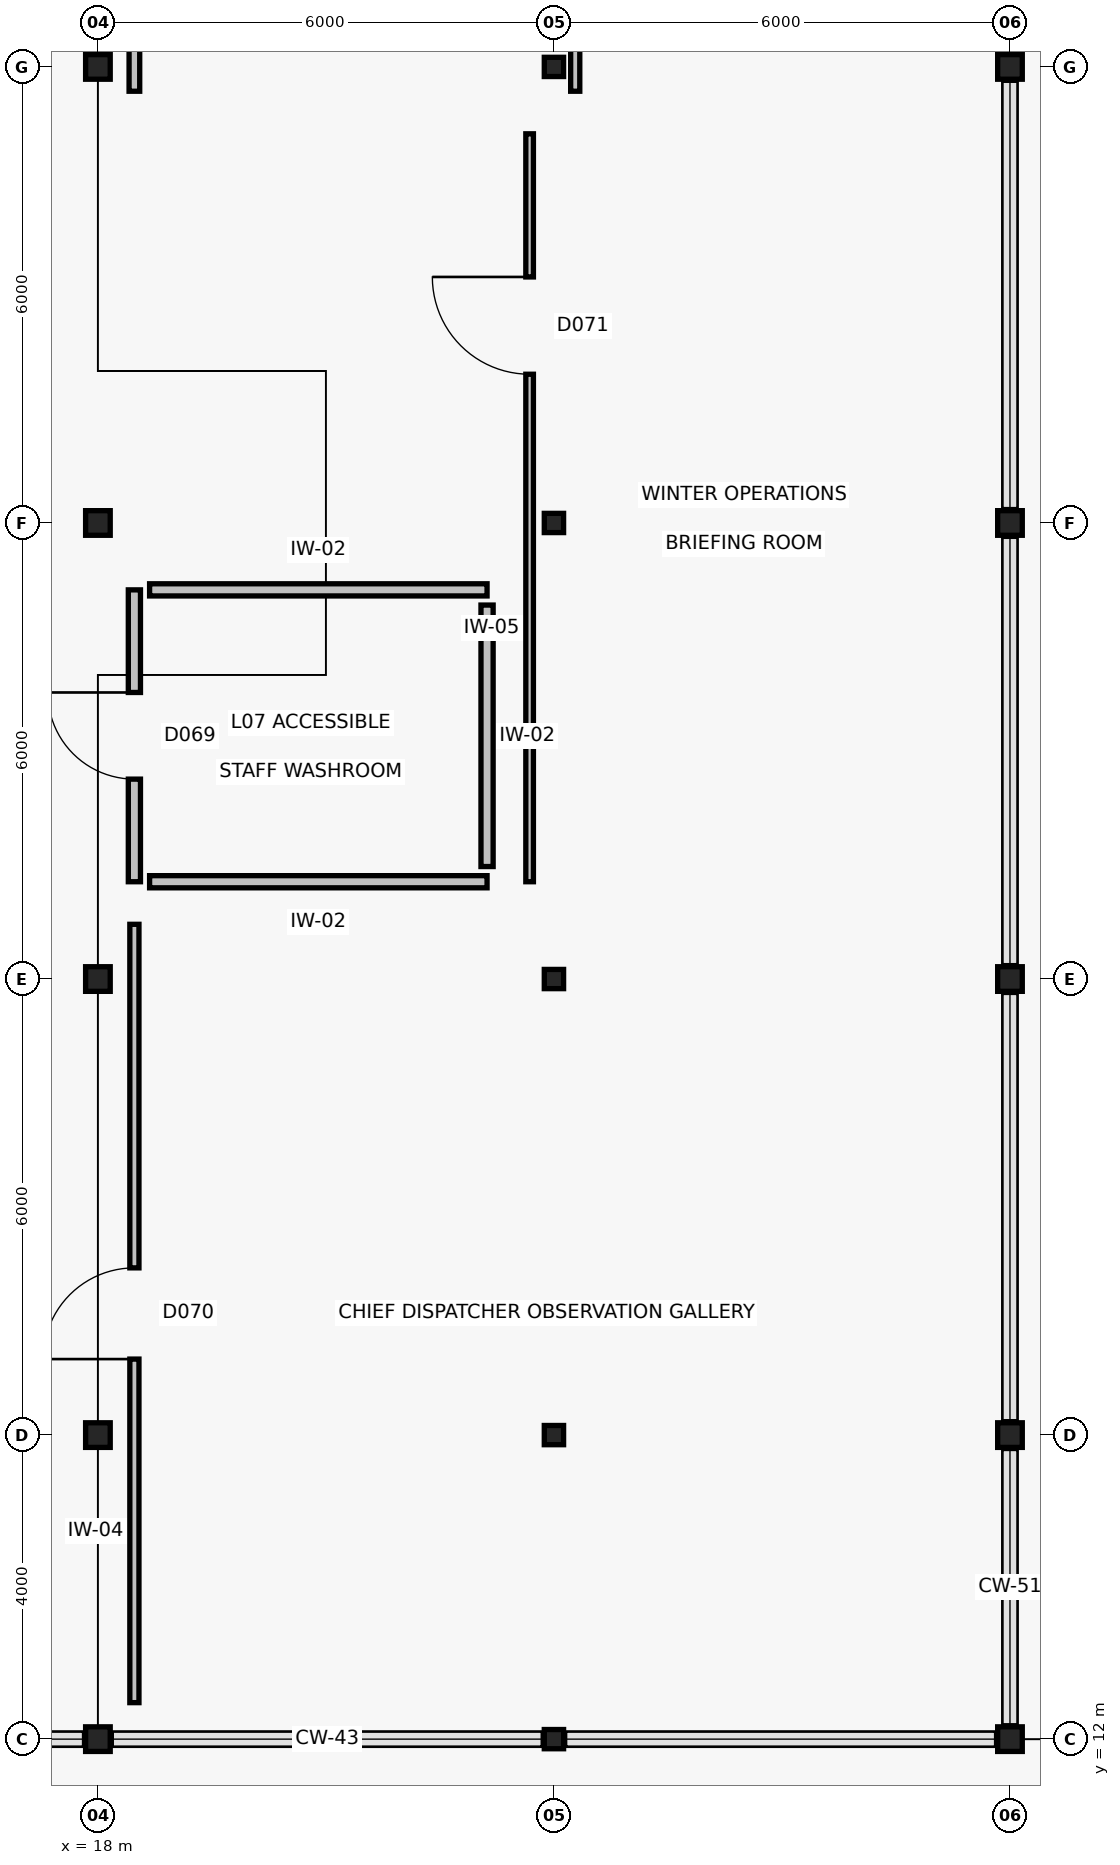
"""IFC4 building model, lengths in metres.
Left out: names, types, materials, properties, quantities, classifications, styles, units other than length and angle.
Written with IfcOpenShell. Run it as: python <this file> out.ifc"""

import sys

from ifc_helpers import new_model, si_unit, direction, frame, frame_2d, origin, origin_2d, place, context, subcontext, project, spatial, rectangle, hollow_circle, i_section, extrude, element, fill, save


model = new_model("IFC4")
c1 = context("Model", 3, precision=1e-05, world=origin(), true_north=direction((0.0, 1.0)))
c2 = subcontext(c1, "Body", "Model", "MODEL_VIEW")
j1 = project(units=[si_unit("LENGTHUNIT", "METRE"), si_unit("PLANEANGLEUNIT", "RADIAN")], contexts=[c1])
p1 = place(None, origin())
s1 = spatial("IfcSite", under=j1, at=p1, CompositionType="ELEMENT")
p2 = place(p1, origin())
s2 = spatial("IfcBuilding", under=s1, at=p2, CompositionType="ELEMENT")
p3 = place(p2, frame((0.0, 0.0, 28.6)))
s3 = spatial("IfcBuildingStorey", under=s2, at=p3, CompositionType="ELEMENT", Elevation=28.6)
for number, where, z_axis, x_axis in (
    (1, (18.0, 12.0, 0.0), (0.0, 0.0, 1.0), (1.0, 0.0, 0.0)),
    (2, (18.0, 16.0, 0.0), (0.0, 0.0, 1.0), (1.0, 0.0, 0.0)),
    (3, (18.0, 22.0, 0.0), (0.0, 0.0, 1.0), (1.0, 0.0, 0.0)),
    (4, (18.0, 28.0, 0.0), (0.0, 0.0, 1.0), (1.0, 0.0, 0.0)),
    (5, (18.0, 34.0, 0.0), (0.0, 0.0, 1.0), (1.0, 0.0, 0.0)),
):
    element("IfcColumn", number, at=place(p3, frame(where, z_axis=z_axis, x_axis=x_axis)), inside=s3, PredefinedType="COLUMN", context=c2, shape_type="SweptSolid", body=[
        extrude(hollow_circle(Radius=0.162, WallThickness=0.013, at=origin_2d()), origin(), (0.0, 0.0, 1.0), 4.2),
    ])
for number, where, z_axis, x_axis in (
    (6, (24.0, 12.0, 0.0), (0.0, 0.0, 1.0), (1.0, 0.0, 0.0)),
    (7, (24.0, 16.0, 0.0), (0.0, 0.0, 1.0), (1.0, 0.0, 0.0)),
    (8, (24.0, 22.0, 0.0), (0.0, 0.0, 1.0), (1.0, 0.0, 0.0)),
    (9, (24.0, 28.0, 0.0), (0.0, 0.0, 1.0), (1.0, 0.0, 0.0)),
    (10, (24.0, 34.0, 0.0), (0.0, 0.0, 1.0), (1.0, 0.0, 0.0)),
):
    element("IfcColumn", number, at=place(p3, frame(where, z_axis=z_axis, x_axis=x_axis)), inside=s3, PredefinedType="COLUMN", context=c2, shape_type="SweptSolid", body=[
        extrude(i_section(OverallWidth=0.254, OverallDepth=0.253, WebThickness=0.009, FlangeThickness=0.014, FilletRadius=0.012, at=origin_2d()), origin(), (0.0, 0.0, 1.0), 4.2),
    ])
for number, where, z_axis, x_axis in (
    (11, (30.0, 12.0, 0.0), (0.0, 0.0, 1.0), (1.0, 0.0, 0.0)),
    (12, (30.0, 16.0, 0.0), (0.0, 0.0, 1.0), (1.0, 0.0, 0.0)),
    (13, (30.0, 22.0, 0.0), (0.0, 0.0, 1.0), (1.0, 0.0, 0.0)),
    (14, (30.0, 28.0, 0.0), (0.0, 0.0, 1.0), (1.0, 0.0, 0.0)),
    (15, (30.0, 34.0, 0.0), (0.0, 0.0, 1.0), (1.0, 0.0, 0.0)),
):
    element("IfcColumn", number, at=place(p3, frame(where, z_axis=z_axis, x_axis=x_axis)), inside=s3, PredefinedType="COLUMN", context=c2, shape_type="SweptSolid", body=[
        extrude(hollow_circle(Radius=0.162, WallThickness=0.013, at=origin_2d()), origin(), (0.0, 0.0, 1.0), 4.2),
    ])
p4 = place(p3, frame((18.48, 23.28, 0.0), z_axis=(0.0, 0.0, 1.0), x_axis=(0.0, 1.0, 0.0)))
e16 = element("IfcWall", 16, at=p4, inside=s3, PredefinedType="PARTITIONING", context=c2, shape_type="SweptSolid", body=[
    extrude(rectangle(XDim=3.84, YDim=0.16, at=frame_2d((1.92, 0.0))), origin(), (0.0, 0.0, 1.0), 4.0),
])
p5 = place(p4, frame((1.35, 0.0, 0.0)))
e17 = element("IfcOpeningElement", 17, at=p5, cuts=e16, PredefinedType="OPENING", context=c2, shape_type="SweptSolid", body=[
    extrude(rectangle(XDim=1.14, YDim=2.15, at=frame_2d((0.57, 1.075))), frame((0.0, 0.095, 0.0), z_axis=(0.0, -1.0, 0.0), x_axis=(1.0, 0.0, 0.0)), (0.0, 0.0, 1.0), 0.19),
])
for number, where, z_axis, x_axis in (
    (18, (18.68, 27.12, 0.0), (0.0, 0.0, 1.0), (1.0, 0.0, 0.0)),
    (19, (23.12, 23.28, 0.0), (0.0, 0.0, 1.0), (-1.0, 0.0, 0.0)),
):
    element("IfcWall", number, at=place(p3, frame(where, z_axis=z_axis, x_axis=x_axis)), inside=s3, PredefinedType="PARTITIONING", context=c2, shape_type="SweptSolid", body=[
        extrude(rectangle(XDim=4.44, YDim=0.16, at=frame_2d((2.22, 0.0))), origin(), (0.0, 0.0, 1.0), 3.65),
    ])
p6 = place(p3, frame((23.12, 26.92, 0.0), z_axis=(0.0, 0.0, 1.0), x_axis=(0.0, -1.0, 0.0)))
e20 = element("IfcWall", 20, at=p6, inside=s3, PredefinedType="PARTITIONING", context=c2, shape_type="SweptSolid", body=[
    extrude(rectangle(XDim=3.44, YDim=0.16, at=frame_2d((1.72, 0.0))), origin(), (0.0, 0.0, 1.0), 4.0),
])
p7 = place(p3, frame((18.48, 12.48, 0.0), z_axis=(0.0, 0.0, 1.0), x_axis=(0.0, 1.0, 0.0)))
e21 = element("IfcWall", 21, at=p7, inside=s3, PredefinedType="PARTITIONING", context=c2, shape_type="SweptSolid", body=[
    extrude(rectangle(XDim=10.24, YDim=0.12, at=frame_2d((5.12, 0.0))), origin(), (0.0, 0.0, 1.0), 3.604),
])
p8 = place(p7, frame((4.52, 0.0, 0.0)))
e22 = element("IfcOpeningElement", 22, at=p8, cuts=e21, PredefinedType="OPENING", context=c2, shape_type="SweptSolid", body=[
    extrude(rectangle(XDim=1.2, YDim=2.15, at=frame_2d((0.6, 1.075))), frame((0.0, 0.075, 0.0), z_axis=(0.0, -1.0, 0.0), x_axis=(1.0, 0.0, 0.0)), (0.0, 0.0, 1.0), 0.15),
])
p9 = place(p3, frame((23.68, 23.28, 0.0), z_axis=(0.0, 0.0, 1.0), x_axis=(0.0, 1.0, 0.0)))
e23 = element("IfcWall", 23, at=p9, inside=s3, PredefinedType="PARTITIONING", context=c2, shape_type="SweptSolid", body=[
    extrude(rectangle(XDim=9.84, YDim=0.1, at=frame_2d((4.92, 0.0))), origin(), (0.0, 0.0, 1.0), 3.421),
])
p10 = place(p9, frame((6.677, 0.0, 0.0)))
e24 = element("IfcOpeningElement", 24, at=p10, cuts=e23, PredefinedType="OPENING", context=c2, shape_type="SweptSolid", body=[
    extrude(rectangle(XDim=1.28, YDim=2.2, at=frame_2d((0.64, 1.1))), frame((0.0, 0.065, 0.0), z_axis=(0.0, -1.0, 0.0), x_axis=(1.0, 0.0, 0.0)), (0.0, 0.0, 1.0), 0.13),
])
p11 = place(p3, frame((18.48, 33.68, 0.0), z_axis=(0.0, 0.0, 1.0), x_axis=(0.0, 1.0, 0.0)))
e25 = element("IfcWall", 25, at=p11, inside=s3, PredefinedType="PARTITIONING", context=c2, shape_type="SweptSolid", body=[
    extrude(rectangle(XDim=9.64, YDim=0.14, at=frame_2d((4.82, 0.0))), origin(), (0.0, 0.0, 1.0), 3.497),
])
p12 = place(p11, frame((3.052, 0.0, 0.0)))
e26 = element("IfcOpeningElement", 26, at=p12, cuts=e25, PredefinedType="OPENING", context=c2, shape_type="SweptSolid", body=[
    extrude(rectangle(XDim=0.92, YDim=2.1, at=frame_2d((0.46, 1.05))), frame((0.0, 0.085, 0.0), z_axis=(0.0, -1.0, 0.0), x_axis=(1.0, 0.0, 0.0)), (0.0, 0.0, 1.0), 0.17),
])
p13 = place(p3, frame((24.28, 33.68, 0.0), z_axis=(0.0, 0.0, 1.0), x_axis=(0.0, 1.0, 0.0)))
e27 = element("IfcWall", 27, at=p13, inside=s3, PredefinedType="PARTITIONING", context=c2, shape_type="SweptSolid", body=[
    extrude(rectangle(XDim=9.64, YDim=0.12, at=frame_2d((4.82, 0.0))), origin(), (0.0, 0.0, 1.0), 3.497),
])
p14 = place(p13, frame((3.038, 0.0, 0.0)))
e28 = element("IfcOpeningElement", 28, at=p14, cuts=e27, PredefinedType="OPENING", context=c2, shape_type="SweptSolid", body=[
    extrude(rectangle(XDim=0.96, YDim=2.1, at=frame_2d((0.48, 1.05))), frame((0.0, 0.075, 0.0), z_axis=(0.0, -1.0, 0.0), x_axis=(1.0, 0.0, 0.0)), (0.0, 0.0, 1.0), 0.15),
])
p15 = place(p5, origin())
e29 = element("IfcDoor", 29, at=p15, inside=s3, OperationType="SINGLE_SWING_RIGHT", PredefinedType="DOOR", context=c2, shape_type="SweptSolid", body=[
    extrude(rectangle(XDim=1.14, YDim=2.15, at=frame_2d((0.57, 1.075))), frame((0.0, 0.025, 0.0), z_axis=(0.0, -1.0, 0.0), x_axis=(1.0, 0.0, 0.0)), (0.0, 0.0, 1.0), 0.05),
])
fill(e17, e29)
p16 = place(p8, origin())
e30 = element("IfcDoor", 30, at=p16, inside=s3, OperationType="SINGLE_SWING_LEFT", PredefinedType="DOOR", context=c2, shape_type="SweptSolid", body=[
    extrude(rectangle(XDim=1.2, YDim=2.15, at=frame_2d((0.6, 1.075))), frame((0.0, 0.025, 0.0), z_axis=(0.0, -1.0, 0.0), x_axis=(1.0, 0.0, 0.0)), (0.0, 0.0, 1.0), 0.05),
])
fill(e22, e30)
p17 = place(p10, origin())
e31 = element("IfcDoor", 31, at=p17, inside=s3, OperationType="SINGLE_SWING_RIGHT", PredefinedType="DOOR", context=c2, shape_type="SweptSolid", body=[
    extrude(rectangle(XDim=1.28, YDim=2.2, at=frame_2d((0.64, 1.1))), frame((0.0, 0.025, 0.0), z_axis=(0.0, -1.0, 0.0), x_axis=(1.0, 0.0, 0.0)), (0.0, 0.0, 1.0), 0.05),
])
fill(e24, e31)
save(model, sys.argv[1])
